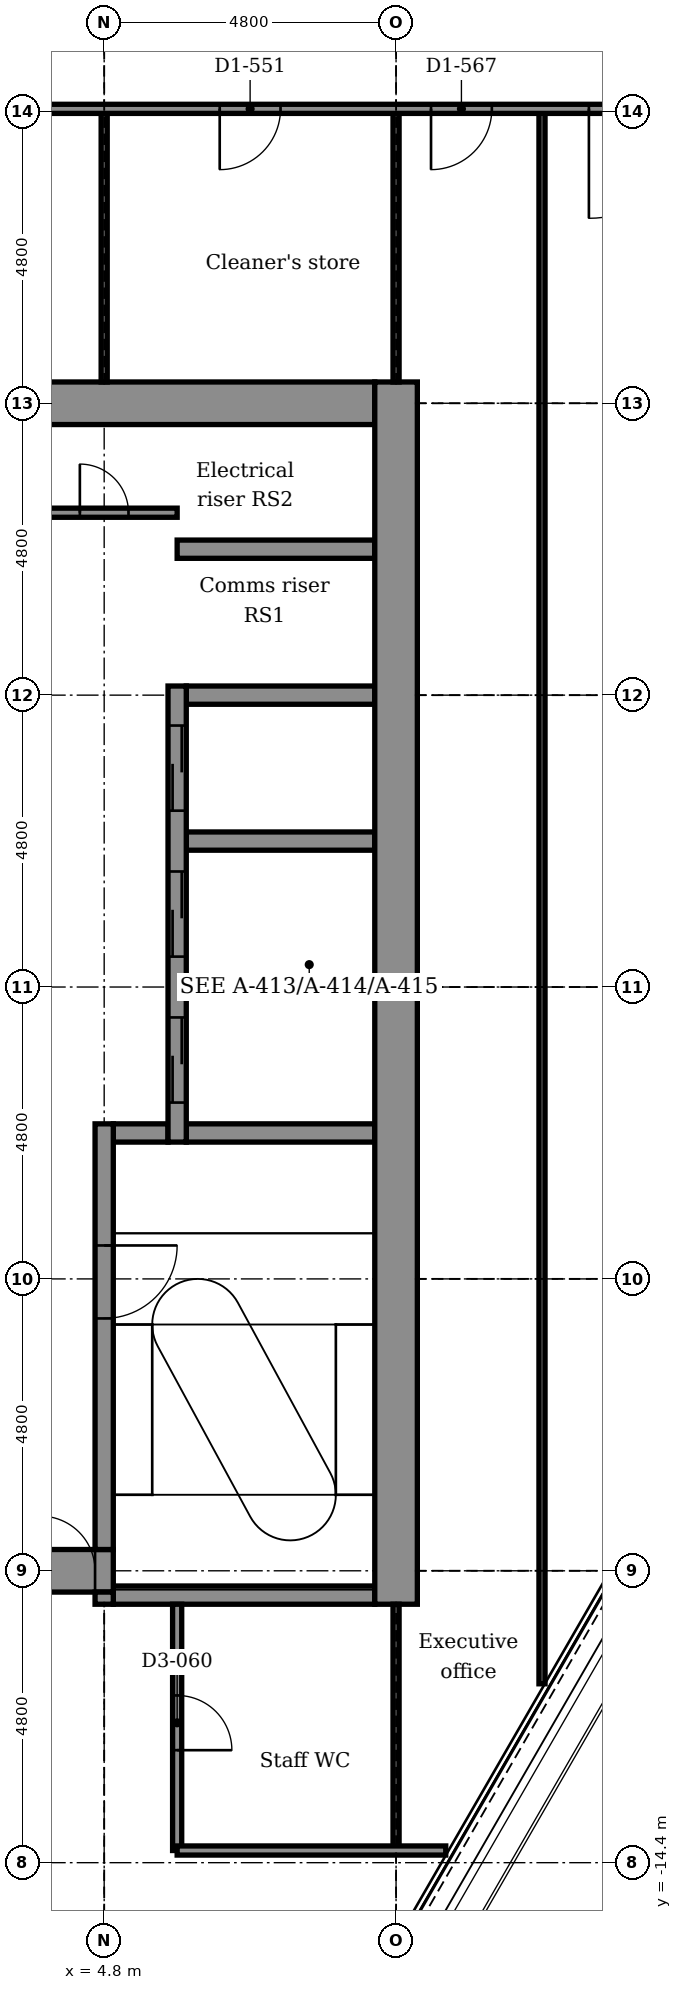
"""IFC4 building model, lengths in metres.
Left out: names, types, materials, properties, quantities, classifications, styles, units other than length and angle.
Written with IfcOpenShell. Run it as: python <this file> out.ifc"""

import sys

from ifc_helpers import new_model, si_unit, direction, frame, frame_2d, origin, place, context, subcontext, project, spatial, rectangle, extrude, element, fill, save


model = new_model("IFC4")
c1 = context("Model", 3, precision=1e-05, world=origin(), true_north=direction((0.0, 1.0)))
c2 = subcontext(c1, "Body", "Model", "MODEL_VIEW")
j1 = project(units=[si_unit("LENGTHUNIT", "METRE"), si_unit("PLANEANGLEUNIT", "RADIAN")], contexts=[c1])
p1 = place(None, origin())
s1 = spatial("IfcSite", under=j1, at=p1, CompositionType="ELEMENT")
p2 = place(p1, origin())
s2 = spatial("IfcBuilding", under=s1, at=p2, CompositionType="ELEMENT")
p3 = place(p2, frame((0.0, 0.0, 197.3)))
s3 = spatial("IfcBuildingStorey", under=s2, at=p3, CompositionType="ELEMENT", Elevation=197.3)
p4 = place(p3, frame((4.95, -10.0, -0.15), z_axis=(0.0, 0.0, 1.0), x_axis=(1.0, 0.0, 0.0)))
e1 = element("IfcWall", 1, at=p4, inside=s3, PredefinedType="STANDARD", context=c2, shape_type="SweptSolid", body=[
    extrude(rectangle(XDim=4.3, YDim=0.3, at=frame_2d((2.15, 0.0))), origin(), (0.0, 0.0, 1.0), 3.9),
])
p5 = place(p3, frame((-5.25, -9.6, -0.15), z_axis=(0.0, 0.0, 1.0), x_axis=(1.0, 0.0, 0.0)))
e2 = element("IfcWall", 2, at=p5, inside=s3, PredefinedType="SHEAR", context=c2, shape_type="SweptSolid", body=[
    extrude(rectangle(XDim=10.2, YDim=0.7, at=frame_2d((5.1, 0.0))), origin(), (0.0, 0.0, 1.0), 3.9),
])
p6 = place(p5, frame((9.0, 0.0, 0.15)))
e3 = element("IfcOpeningElement", 3, at=p6, cuts=e2, PredefinedType="OPENING", context=c2, shape_type="SweptSolid", body=[
    extrude(rectangle(XDim=0.9, YDim=2.1, at=frame_2d((0.45, 1.05))), frame((0.0, 0.36, 0.0), z_axis=(0.0, -1.0, 0.0), x_axis=(1.0, 0.0, 0.0)), (0.0, 0.0, 1.0), 0.72),
])
p7 = place(p3, frame((4.95, -2.4, -0.15), z_axis=(0.0, 0.0, 1.0), x_axis=(1.0, 0.0, 0.0)))
e4 = element("IfcWall", 4, at=p7, inside=s3, PredefinedType="STANDARD", context=c2, shape_type="SweptSolid", body=[
    extrude(rectangle(XDim=0.9, YDim=0.3, at=frame_2d((0.45, 0.0))), origin(), (0.0, 0.0, 1.0), 3.9),
])
for number, where, z_axis, x_axis in (
    (5, (6.15, -2.4, -0.15), (0.0, 0.0, 1.0), (1.0, 0.0, 0.0)),
    (6, (6.15, 0.0, -0.15), (0.0, 0.0, 1.0), (1.0, 0.0, 0.0)),
    (7, (6.15, 2.4, -0.15), (0.0, 0.0, 1.0), (1.0, 0.0, 0.0)),
    (8, (6.15, 4.8, -0.15), (0.0, 0.0, 1.0), (1.0, 0.0, 0.0)),
):
    element("IfcWall", number, at=place(p3, frame(where, z_axis=z_axis, x_axis=x_axis)), inside=s3, PredefinedType="STANDARD", context=c2, shape_type="SweptSolid", body=[
        extrude(rectangle(XDim=3.1, YDim=0.3, at=frame_2d((1.55, 0.0))), origin(), (0.0, 0.0, 1.0), 3.9),
    ])
p8 = place(p3, frame((6.0, 7.2, -0.15), z_axis=(0.0, 0.0, 1.0), x_axis=(1.0, 0.0, 0.0)))
e9 = element("IfcWall", 9, at=p8, inside=s3, PredefinedType="STANDARD", context=c2, shape_type="SweptSolid", body=[
    extrude(rectangle(XDim=3.25, YDim=0.3, at=frame_2d((1.625, 0.0))), origin(), (0.0, 0.0, 1.0), 3.9),
])
p9 = place(p3, frame((-5.25, 9.6, -0.15), z_axis=(0.0, 0.0, 1.0), x_axis=(1.0, 0.0, 0.0)))
e10 = element("IfcWall", 10, at=p9, inside=s3, PredefinedType="SHEAR", context=c2, shape_type="SweptSolid", body=[
    extrude(rectangle(XDim=14.5, YDim=0.7, at=frame_2d((7.25, 0.0))), origin(), (0.0, 0.0, 1.0), 3.9),
])
p10 = place(p9, frame((0.6, 0.0, 0.15)))
e11 = element("IfcOpeningElement", 11, at=p10, cuts=e10, PredefinedType="OPENING", context=c2, shape_type="SweptSolid", body=[
    extrude(rectangle(XDim=0.9, YDim=2.1, at=frame_2d((0.45, 1.05))), frame((0.0, 0.36, 0.0), z_axis=(0.0, -1.0, 0.0), x_axis=(1.0, 0.0, 0.0)), (0.0, 0.0, 1.0), 0.72),
])
p11 = place(p3, frame((4.8, -10.15, -0.15), z_axis=(0.0, 0.0, 1.0), x_axis=(0.0, 1.0, 0.0)))
e12 = element("IfcWall", 12, at=p11, inside=s3, PredefinedType="STANDARD", context=c2, shape_type="SweptSolid", body=[
    extrude(rectangle(XDim=0.2, YDim=0.3, at=frame_2d((0.1, 0.0))), origin(), (0.0, 0.0, 1.0), 3.9),
])
p12 = place(p3, frame((4.8, -9.25, -0.15), z_axis=(0.0, 0.0, 1.0), x_axis=(0.0, 1.0, 0.0)))
e13 = element("IfcWall", 13, at=p12, inside=s3, PredefinedType="STANDARD", context=c2, shape_type="SweptSolid", body=[
    extrude(rectangle(XDim=7.0, YDim=0.3, at=frame_2d((3.5, 0.0))), origin(), (0.0, 0.0, 1.0), 3.9),
])
p13 = place(p12, frame((3.8, 0.0, 0.15)))
e14 = element("IfcOpeningElement", 14, at=p13, cuts=e13, PredefinedType="OPENING", context=c2, shape_type="SweptSolid", body=[
    extrude(rectangle(XDim=1.2, YDim=2.1, at=frame_2d((0.6, 1.05))), frame((0.0, 0.16, 0.0), z_axis=(0.0, -1.0, 0.0), x_axis=(1.0, 0.0, 0.0)), (0.0, 0.0, 1.0), 0.32),
])
p14 = place(p3, frame((6.0, -2.55, -0.15), z_axis=(0.0, 0.0, 1.0), x_axis=(0.0, 1.0, 0.0)))
e15 = element("IfcWall", 15, at=p14, inside=s3, PredefinedType="STANDARD", context=c2, shape_type="SweptSolid", body=[
    extrude(rectangle(XDim=7.5, YDim=0.3, at=frame_2d((3.75, 0.0))), origin(), (0.0, 0.0, 1.0), 3.9),
])
p15 = place(p14, frame((0.65, 0.0, 0.15)))
e16 = element("IfcOpeningElement", 16, at=p15, cuts=e15, PredefinedType="OPENING", context=c2, shape_type="SweptSolid", body=[
    extrude(rectangle(XDim=1.4, YDim=2.1, at=frame_2d((0.7, 1.05))), frame((0.0, 0.16, 0.0), z_axis=(0.0, -1.0, 0.0), x_axis=(1.0, 0.0, 0.0)), (0.0, 0.0, 1.0), 0.32),
])
p16 = place(p14, frame((3.05, 0.0, 0.15)))
e17 = element("IfcOpeningElement", 17, at=p16, cuts=e15, PredefinedType="OPENING", context=c2, shape_type="SweptSolid", body=[
    extrude(rectangle(XDim=1.4, YDim=2.1, at=frame_2d((0.7, 1.05))), frame((0.0, 0.16, 0.0), z_axis=(0.0, -1.0, 0.0), x_axis=(1.0, 0.0, 0.0)), (0.0, 0.0, 1.0), 0.32),
])
p17 = place(p14, frame((5.45, 0.0, 0.15)))
e18 = element("IfcOpeningElement", 18, at=p17, cuts=e15, PredefinedType="OPENING", context=c2, shape_type="SweptSolid", body=[
    extrude(rectangle(XDim=1.4, YDim=2.1, at=frame_2d((0.7, 1.05))), frame((0.0, 0.16, 0.0), z_axis=(0.0, -1.0, 0.0), x_axis=(1.0, 0.0, 0.0)), (0.0, 0.0, 1.0), 0.32),
])
p18 = place(p3, frame((9.6, -10.15, -0.15), z_axis=(0.0, 0.0, 1.0), x_axis=(0.0, 1.0, 0.0)))
e19 = element("IfcWall", 19, at=p18, inside=s3, PredefinedType="SHEAR", context=c2, shape_type="SweptSolid", body=[
    extrude(rectangle(XDim=20.1, YDim=0.7, at=frame_2d((10.05, 0.0))), origin(), (0.0, 0.0, 1.0), 3.9),
])
p19 = place(p3, frame((12.0, -11.458, 0.0), z_axis=(0.0, 0.0, 1.0), x_axis=(0.0, 1.0, 0.0)))
e20 = element("IfcWall", 20, at=p19, inside=s3, PredefinedType="PARTITIONING", context=c2, shape_type="SweptSolid", body=[
    extrude(rectangle(XDim=25.9, YDim=0.1, at=frame_2d((12.95, 0.0))), origin(), (0.0, 0.0, 1.0), 3.75),
])
p20 = place(p3, frame((9.6, -14.2, 0.0), z_axis=(0.0, 0.0, 1.0), x_axis=(0.0, 1.0, 0.0)))
e21 = element("IfcWall", 21, at=p20, inside=s3, PredefinedType="PARTITIONING", context=c2, shape_type="SweptSolid", body=[
    extrude(rectangle(XDim=4.05, YDim=0.1, at=frame_2d((2.025, 0.0))), origin(), (0.0, 0.0, 1.0), 3.066),
])
p21 = place(p3, frame((9.6, 9.95, 0.0), z_axis=(0.0, 0.0, 1.0), x_axis=(0.0, 1.0, 0.0)))
e22 = element("IfcWall", 22, at=p21, inside=s3, PredefinedType="PARTITIONING", context=c2, shape_type="SweptSolid", body=[
    extrude(rectangle(XDim=4.491, YDim=0.1, at=frame_2d((2.246, 0.0))), origin(), (0.0, 0.0, 1.0), 3.066),
])
p22 = place(p3, frame((6.0, -14.2, 0.0), z_axis=(0.0, 0.0, 1.0), x_axis=(0.0, 1.0, 0.0)))
e23 = element("IfcWall", 23, at=p22, inside=s3, PredefinedType="PARTITIONING", context=c2, shape_type="SweptSolid", body=[
    extrude(rectangle(XDim=4.05, YDim=0.15, at=frame_2d((2.025, 0.0))), origin(), (0.0, 0.0, 1.0), 3.75),
])
p23 = place(p22, frame((1.65, 0.0, 0.0)))
e24 = element("IfcOpeningElement", 24, at=p23, cuts=e23, PredefinedType="OPENING", context=c2, shape_type="SweptSolid", body=[
    extrude(rectangle(XDim=0.9, YDim=2.1, at=frame_2d((0.45, 1.05))), frame((0.0, 0.085, 0.0), z_axis=(0.0, -1.0, 0.0), x_axis=(1.0, 0.0, 0.0)), (0.0, 0.0, 1.0), 0.17),
])
p24 = place(p3, frame((4.8, 9.95, 0.0), z_axis=(0.0, 0.0, 1.0), x_axis=(0.0, 1.0, 0.0)))
e25 = element("IfcWall", 25, at=p24, inside=s3, PredefinedType="PARTITIONING", context=c2, shape_type="SweptSolid", body=[
    extrude(rectangle(XDim=4.491, YDim=0.1, at=frame_2d((2.246, 0.0))), origin(), (0.0, 0.0, 1.0), 3.066),
])
p25 = place(p3, frame((6.0, -14.2, 0.0), z_axis=(0.0, 0.0, 1.0), x_axis=(1.0, 0.0, 0.0)))
e26 = element("IfcWall", 26, at=p25, inside=s3, PredefinedType="PARTITIONING", context=c2, shape_type="SweptSolid", body=[
    extrude(rectangle(XDim=4.417, YDim=0.15, at=frame_2d((2.208, 0.0))), origin(), (0.0, 0.0, 1.0), 3.75),
])
p26 = place(p3, frame((3.75, 7.8, 0.0), z_axis=(0.0, 0.0, 1.0), x_axis=(1.0, 0.0, 0.0)))
e27 = element("IfcWall", 27, at=p26, inside=s3, PredefinedType="PARTITIONING", context=c2, shape_type="SweptSolid", body=[
    extrude(rectangle(XDim=2.25, YDim=0.15, at=frame_2d((1.125, 0.0))), origin(), (0.0, 0.0, 1.0), 3.75),
])
p27 = place(p26, frame((0.65, 0.0, 0.0)))
e28 = element("IfcOpeningElement", 28, at=p27, cuts=e27, PredefinedType="OPENING", context=c2, shape_type="SweptSolid", body=[
    extrude(rectangle(XDim=0.8, YDim=2.1, at=frame_2d((0.4, 1.05))), frame((0.0, 0.085, 0.0), z_axis=(0.0, -1.0, 0.0), x_axis=(1.0, 0.0, 0.0)), (0.0, 0.0, 1.0), 0.17),
])
p28 = place(p3, frame((-3.0, 14.441, 0.0), z_axis=(0.0, 0.0, 1.0), x_axis=(1.0, 0.0, 0.0)))
e29 = element("IfcWall", 29, at=p28, inside=s3, PredefinedType="PARTITIONING", context=c2, shape_type="SweptSolid", body=[
    extrude(rectangle(XDim=19.843, YDim=0.15, at=frame_2d((9.921, 0.0))), origin(), (0.0, 0.0, 1.0), 3.75),
])
p29 = place(p28, frame((4.9, 0.0, 0.0)))
e30 = element("IfcOpeningElement", 30, at=p29, cuts=e29, PredefinedType="OPENING", context=c2, shape_type="SweptSolid", body=[
    extrude(rectangle(XDim=1.0, YDim=2.1, at=frame_2d((0.5, 1.05))), frame((0.0, 0.085, 0.0), z_axis=(0.0, -1.0, 0.0), x_axis=(1.0, 0.0, 0.0)), (0.0, 0.0, 1.0), 0.17),
])
p30 = place(p28, frame((9.7, 0.0, 0.0)))
e31 = element("IfcOpeningElement", 31, at=p30, cuts=e29, PredefinedType="OPENING", context=c2, shape_type="SweptSolid", body=[
    extrude(rectangle(XDim=1.0, YDim=2.1, at=frame_2d((0.5, 1.05))), frame((0.0, 0.085, 0.0), z_axis=(0.0, -1.0, 0.0), x_axis=(1.0, 0.0, 0.0)), (0.0, 0.0, 1.0), 0.17),
])
p31 = place(p28, frame((13.175, 0.0, 0.0)))
e32 = element("IfcOpeningElement", 32, at=p31, cuts=e29, PredefinedType="OPENING", context=c2, shape_type="SweptSolid", body=[
    extrude(rectangle(XDim=1.0, YDim=2.1, at=frame_2d((0.5, 1.05))), frame((0.0, 0.085, 0.0), z_axis=(0.0, -1.0, 0.0), x_axis=(1.0, 0.0, 0.0)), (0.0, 0.0, 1.0), 0.17),
])
p32 = place(p28, frame((15.771, 0.0, 0.0)))
e33 = element("IfcOpeningElement", 33, at=p32, cuts=e29, PredefinedType="OPENING", context=c2, shape_type="SweptSolid", body=[
    extrude(rectangle(XDim=1.8, YDim=2.1, at=frame_2d((0.9, 1.05))), frame((0.0, 0.085, 0.0), z_axis=(0.0, -1.0, 0.0), x_axis=(1.0, 0.0, 0.0)), (0.0, 0.0, 1.0), 0.17),
])
p33 = place(p27, origin())
e34 = element("IfcDoor", 34, at=p33, inside=s3, OperationType="SINGLE_SWING_LEFT", PredefinedType="DOOR", context=c2, shape_type="SweptSolid", body=[
    extrude(rectangle(XDim=0.8, YDim=2.1, at=frame_2d((0.4, 1.05))), frame((0.0, 0.025, 0.0), z_axis=(0.0, -1.0, 0.0), x_axis=(1.0, 0.0, 0.0)), (0.0, 0.0, 1.0), 0.05),
])
fill(e28, e34)
p34 = place(p30, frame((1.0, 0.0, 0.0), z_axis=(0.0, 0.0, 1.0), x_axis=(-1.0, 0.0, 0.0)))
e35 = element("IfcDoor", 35, at=p34, inside=s3, OperationType="SINGLE_SWING_LEFT", PredefinedType="DOOR", context=c2, shape_type="SweptSolid", body=[
    extrude(rectangle(XDim=1.0, YDim=2.1, at=frame_2d((0.5, 1.05))), frame((0.0, 0.025, 0.0), z_axis=(0.0, -1.0, 0.0), x_axis=(1.0, 0.0, 0.0)), (0.0, 0.0, 1.0), 0.05),
])
fill(e31, e35)
p35 = place(p23, frame((0.9, 0.0, 0.0), z_axis=(0.0, 0.0, 1.0), x_axis=(-1.0, 0.0, 0.0)))
e36 = element("IfcDoor", 36, at=p35, inside=s3, OperationType="SINGLE_SWING_LEFT", PredefinedType="DOOR", context=c2, shape_type="SweptSolid", body=[
    extrude(rectangle(XDim=0.9, YDim=2.1, at=frame_2d((0.45, 1.05))), frame((0.0, 0.025, 0.0), z_axis=(0.0, -1.0, 0.0), x_axis=(1.0, 0.0, 0.0)), (0.0, 0.0, 1.0), 0.05),
])
fill(e24, e36)
p36 = place(p31, frame((1.0, 0.0, 0.0), z_axis=(0.0, 0.0, 1.0), x_axis=(-1.0, 0.0, 0.0)))
e37 = element("IfcDoor", 37, at=p36, inside=s3, OperationType="SINGLE_SWING_LEFT", PredefinedType="DOOR", context=c2, shape_type="SweptSolid", body=[
    extrude(rectangle(XDim=1.0, YDim=2.1, at=frame_2d((0.5, 1.05))), frame((0.0, 0.025, 0.0), z_axis=(0.0, -1.0, 0.0), x_axis=(1.0, 0.0, 0.0)), (0.0, 0.0, 1.0), 0.05),
])
fill(e32, e37)
p37 = place(p32, frame((1.8, 0.0, 0.0), z_axis=(0.0, 0.0, 1.0), x_axis=(-1.0, 0.0, 0.0)))
e38 = element("IfcDoor", 38, at=p37, inside=s3, OperationType="SINGLE_SWING_LEFT", PredefinedType="DOOR", context=c2, shape_type="SweptSolid", body=[
    extrude(rectangle(XDim=1.8, YDim=2.1, at=frame_2d((0.9, 1.05))), frame((0.0, 0.025, 0.0), z_axis=(0.0, -1.0, 0.0), x_axis=(1.0, 0.0, 0.0)), (0.0, 0.0, 1.0), 0.05),
])
fill(e33, e38)
p38 = place(p15, origin())
e39 = element("IfcDoor", 39, at=p38, inside=s3, OperationType="DOUBLE_DOOR_SLIDING", PredefinedType="DOOR", context=c2, shape_type="SweptSolid", body=[
    extrude(rectangle(XDim=1.4, YDim=2.1, at=frame_2d((0.7, 1.05))), frame((0.0, 0.025, 0.0), z_axis=(0.0, -1.0, 0.0), x_axis=(1.0, 0.0, 0.0)), (0.0, 0.0, 1.0), 0.05),
])
fill(e16, e39)
p39 = place(p16, origin())
e40 = element("IfcDoor", 40, at=p39, inside=s3, OperationType="DOUBLE_DOOR_SLIDING", PredefinedType="DOOR", context=c2, shape_type="SweptSolid", body=[
    extrude(rectangle(XDim=1.4, YDim=2.1, at=frame_2d((0.7, 1.05))), frame((0.0, 0.025, 0.0), z_axis=(0.0, -1.0, 0.0), x_axis=(1.0, 0.0, 0.0)), (0.0, 0.0, 1.0), 0.05),
])
fill(e17, e40)
p40 = place(p17, origin())
e41 = element("IfcDoor", 41, at=p40, inside=s3, OperationType="DOUBLE_DOOR_SLIDING", PredefinedType="DOOR", context=c2, shape_type="SweptSolid", body=[
    extrude(rectangle(XDim=1.4, YDim=2.1, at=frame_2d((0.7, 1.05))), frame((0.0, 0.025, 0.0), z_axis=(0.0, -1.0, 0.0), x_axis=(1.0, 0.0, 0.0)), (0.0, 0.0, 1.0), 0.05),
])
fill(e18, e41)
p41 = place(p13, frame((1.2, 0.0, 0.0), z_axis=(0.0, 0.0, 1.0), x_axis=(-1.0, 0.0, 0.0)))
e42 = element("IfcDoor", 42, at=p41, inside=s3, OperationType="SINGLE_SWING_RIGHT", PredefinedType="DOOR", context=c2, shape_type="SweptSolid", body=[
    extrude(rectangle(XDim=1.2, YDim=2.1, at=frame_2d((0.6, 1.05))), frame((0.0, 0.025, 0.0), z_axis=(0.0, -1.0, 0.0), x_axis=(1.0, 0.0, 0.0)), (0.0, 0.0, 1.0), 0.05),
])
fill(e14, e42)
p42 = place(p6, origin())
e43 = element("IfcDoor", 43, at=p42, inside=s3, OperationType="SINGLE_SWING_LEFT", PredefinedType="DOOR", context=c2, shape_type="SweptSolid", body=[
    extrude(rectangle(XDim=0.9, YDim=2.1, at=frame_2d((0.45, 1.05))), frame((0.0, 0.025, 0.0), z_axis=(0.0, -1.0, 0.0), x_axis=(1.0, 0.0, 0.0)), (0.0, 0.0, 1.0), 0.05),
])
fill(e3, e43)
save(model, sys.argv[1])
